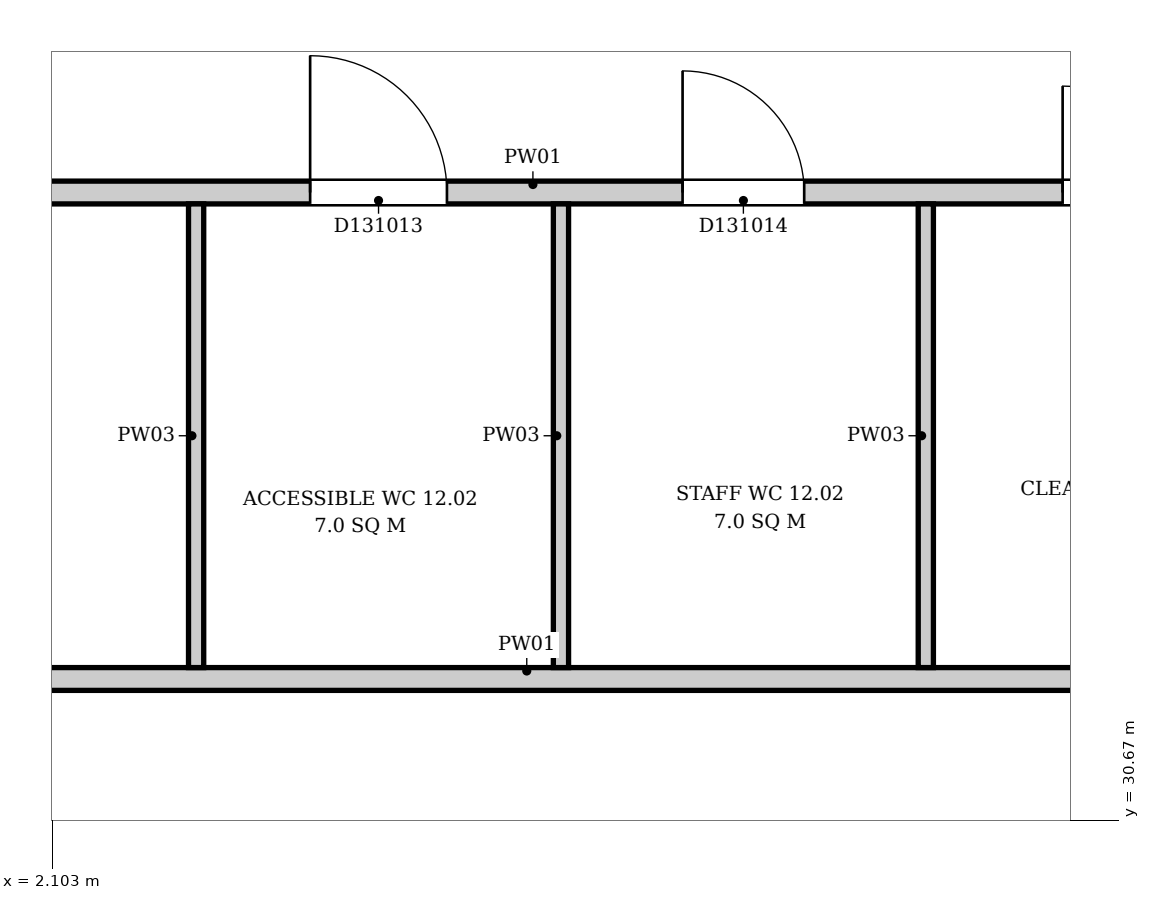
"""IFC4 building model, lengths in metres.
Left out: names, types, materials, properties, quantities, classifications, styles, units other than length and angle.
Written with IfcOpenShell. Run it as: python <this file> out.ifc"""

import sys

from ifc_helpers import new_model, si_unit, direction, frame, frame_2d, origin, place, context, subcontext, project, spatial, rectangle, extrude, element, fill, save


model = new_model("IFC4")
c1 = context("Model", 3, precision=1e-05, world=origin(), true_north=direction((0.0, 1.0)))
c2 = subcontext(c1, "Body", "Model", "MODEL_VIEW")
j1 = project(units=[si_unit("LENGTHUNIT", "METRE"), si_unit("PLANEANGLEUNIT", "RADIAN")], contexts=[c1])
p1 = place(None, origin())
s1 = spatial("IfcSite", under=j1, at=p1, CompositionType="ELEMENT")
p2 = place(p1, origin())
s2 = spatial("IfcBuilding", under=s1, at=p2, CompositionType="ELEMENT")
p3 = place(p2, frame((0.0, 0.0, 61.3)))
s3 = spatial("IfcBuildingStorey", under=s2, at=p3, CompositionType="ELEMENT", Elevation=61.3)
p4 = place(p3, frame((0.056, 31.6, 0.0), z_axis=(0.0, 0.0, 1.0), x_axis=(1.0, 0.0, 0.0)))
e1 = element("IfcWall", 1, at=p4, inside=s3, PredefinedType="PARTITIONING", context=c2, shape_type="SweptSolid", body=[
    extrude(rectangle(XDim=10.338, YDim=0.15, at=frame_2d((5.169, 0.0))), origin(), (0.0, 0.0, 1.0), 3.9),
])
p5 = place(p3, frame((0.056, 34.8, 0.0), z_axis=(0.0, 0.0, 1.0), x_axis=(1.0, 0.0, 0.0)))
e2 = element("IfcWall", 2, at=p5, inside=s3, PredefinedType="PARTITIONING", context=c2, shape_type="SweptSolid", body=[
    extrude(rectangle(XDim=10.419, YDim=0.15, at=frame_2d((5.209, 0.0))), origin(), (0.0, 0.0, 1.0), 3.9),
])
p6 = place(p5, frame((1.094, 0.0, 0.0)))
e3 = element("IfcOpeningElement", 3, at=p6, cuts=e2, PredefinedType="OPENING", context=c2, shape_type="SweptSolid", body=[
    extrude(rectangle(XDim=0.8, YDim=2.1, at=frame_2d((0.4, 1.05))), frame((0.0, 0.085, 0.0), z_axis=(0.0, -1.0, 0.0), x_axis=(1.0, 0.0, 0.0)), (0.0, 0.0, 1.0), 0.17),
])
p7 = place(p5, frame((3.744, 0.0, 0.0)))
e4 = element("IfcOpeningElement", 4, at=p7, cuts=e2, PredefinedType="OPENING", context=c2, shape_type="SweptSolid", body=[
    extrude(rectangle(XDim=0.9, YDim=2.1, at=frame_2d((0.45, 1.05))), frame((0.0, 0.085, 0.0), z_axis=(0.0, -1.0, 0.0), x_axis=(1.0, 0.0, 0.0)), (0.0, 0.0, 1.0), 0.17),
])
p8 = place(p5, frame((6.194, 0.0, 0.0)))
e5 = element("IfcOpeningElement", 5, at=p8, cuts=e2, PredefinedType="OPENING", context=c2, shape_type="SweptSolid", body=[
    extrude(rectangle(XDim=0.8, YDim=2.1, at=frame_2d((0.4, 1.05))), frame((0.0, 0.085, 0.0), z_axis=(0.0, -1.0, 0.0), x_axis=(1.0, 0.0, 0.0)), (0.0, 0.0, 1.0), 0.17),
])
p9 = place(p5, frame((8.694, 0.0, 0.0)))
e6 = element("IfcOpeningElement", 6, at=p9, cuts=e2, PredefinedType="OPENING", context=c2, shape_type="SweptSolid", body=[
    extrude(rectangle(XDim=0.7, YDim=2.1, at=frame_2d((0.35, 1.05))), frame((0.0, 0.085, 0.0), z_axis=(0.0, -1.0, 0.0), x_axis=(1.0, 0.0, 0.0)), (0.0, 0.0, 1.0), 0.17),
])
for number, where, z_axis, x_axis in (
    (7, (3.05, 31.675, 0.0), (0.0, 0.0, 1.0), (0.0, 1.0, 0.0)),
    (8, (5.45, 31.675, 0.0), (0.0, 0.0, 1.0), (0.0, 1.0, 0.0)),
    (9, (7.85, 31.675, 0.0), (0.0, 0.0, 1.0), (0.0, 1.0, 0.0)),
):
    element("IfcWall", number, at=place(p3, frame(where, z_axis=z_axis, x_axis=x_axis)), inside=s3, PredefinedType="PARTITIONING", context=c2, shape_type="SweptSolid", body=[
        extrude(rectangle(XDim=3.05, YDim=0.1, at=frame_2d((1.525, 0.0))), origin(), (0.0, 0.0, 1.0), 3.9),
    ])
p10 = place(p7, origin())
e10 = element("IfcDoor", 10, at=p10, inside=s3, OperationType="SINGLE_SWING_LEFT", PredefinedType="DOOR", context=c2, shape_type="SweptSolid", body=[
    extrude(rectangle(XDim=0.9, YDim=2.1, at=frame_2d((0.45, 1.05))), frame((0.0, 0.025, 0.0), z_axis=(0.0, -1.0, 0.0), x_axis=(1.0, 0.0, 0.0)), (0.0, 0.0, 1.0), 0.05),
])
fill(e4, e10)
p11 = place(p8, origin())
e11 = element("IfcDoor", 11, at=p11, inside=s3, OperationType="SINGLE_SWING_RIGHT", PredefinedType="DOOR", context=c2, shape_type="SweptSolid", body=[
    extrude(rectangle(XDim=0.8, YDim=2.1, at=frame_2d((0.4, 1.05))), frame((0.0, 0.025, 0.0), z_axis=(0.0, -1.0, 0.0), x_axis=(1.0, 0.0, 0.0)), (0.0, 0.0, 1.0), 0.05),
])
fill(e5, e11)
p12 = place(p9, origin())
e12 = element("IfcDoor", 12, at=p12, inside=s3, OperationType="SINGLE_SWING_LEFT", PredefinedType="DOOR", context=c2, shape_type="SweptSolid", body=[
    extrude(rectangle(XDim=0.7, YDim=2.1, at=frame_2d((0.35, 1.05))), frame((0.0, 0.025, 0.0), z_axis=(0.0, -1.0, 0.0), x_axis=(1.0, 0.0, 0.0)), (0.0, 0.0, 1.0), 0.05),
])
fill(e6, e12)
save(model, sys.argv[1])
